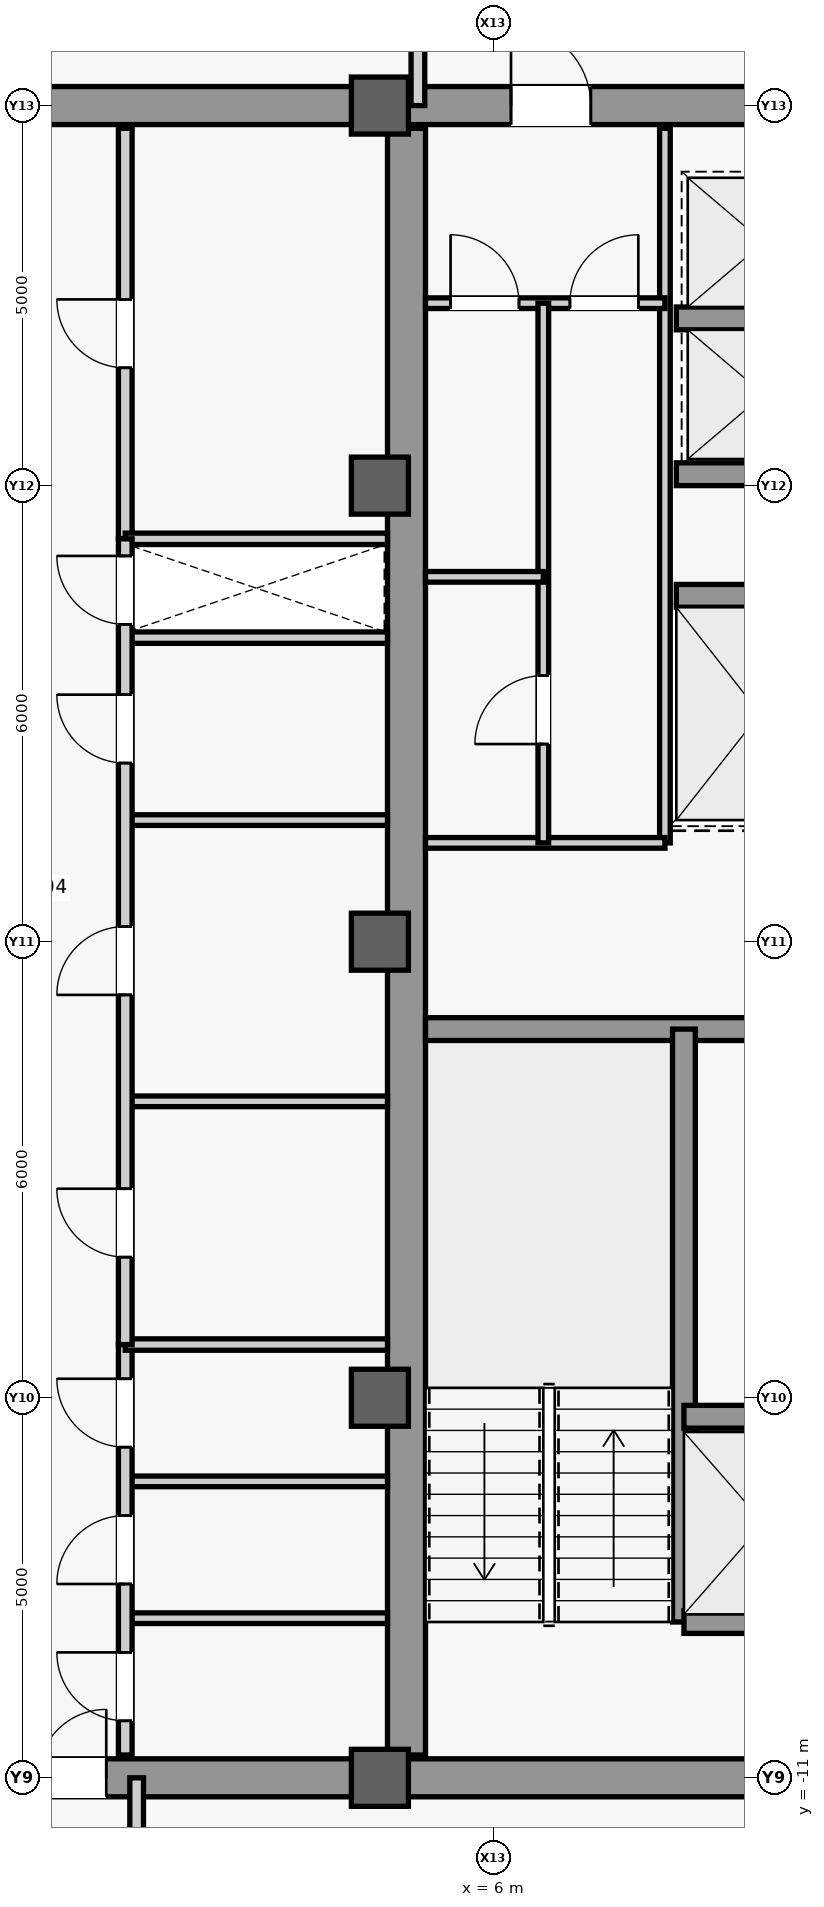
"""IFC4 building model, lengths in metres.
Left out: names, types, materials, properties, quantities, classifications, styles, units other than length and angle.
Written with IfcOpenShell. Run it as: python <this file> out.ifc"""

import sys

from ifc_helpers import new_model, si_unit, direction, frame, frame_2d, origin, origin_2d, place, context, subcontext, project, spatial, rectangle, extrude, source, transform, mapped, element, fill, save


model = new_model("IFC4")
c1 = context("Model", 3, precision=1e-05, world=origin(), true_north=direction((0.0, 1.0)))
c2 = subcontext(c1, "Body", "Model", "MODEL_VIEW")
j1 = project(units=[si_unit("LENGTHUNIT", "METRE"), si_unit("PLANEANGLEUNIT", "RADIAN")], contexts=[c1])
p1 = place(None, origin())
s1 = spatial("IfcSite", under=j1, at=p1, CompositionType="ELEMENT")
p2 = place(p1, origin())
s2 = spatial("IfcBuilding", under=s1, at=p2, CompositionType="ELEMENT")
p3 = place(p2, frame((0.0, 0.0, 342.3)))
s3 = spatial("IfcBuildingStorey", under=s2, at=p3, CompositionType="ELEMENT", Elevation=342.3)
m1 = source(origin(), c2, "Body", "SweptSolid", [
    extrude(rectangle(XDim=21.4, YDim=0.5, at=frame_2d((10.7, 0.0))), origin(), (0.0, 0.0, 1.0), 3.7),
])
p4 = place(p3, frame((4.85, -10.7, 0.0), z_axis=(0.0, 0.0, 1.0), x_axis=(0.0, 1.0, 0.0)))
e1 = element("IfcWall", 1, at=p4, inside=s3, PredefinedType="SHEAR", context=c2, shape_type="MappedRepresentation", body=[
    mapped(m1, transform((0.0, 0.0, 0.0), scale=1.0)),
])
m2 = source(origin(), c2, "Body", "SweptSolid", [
    extrude(rectangle(XDim=5.9, YDim=0.5, at=frame_2d((2.95, 0.0))), origin(), (0.0, 0.0, 1.0), 3.7),
])
p5 = place(p3, frame((4.85, -11.0, 0.0), z_axis=(0.0, 0.0, 1.0), x_axis=(1.0, 0.0, 0.0)))
e2 = element("IfcWall", 2, at=p5, inside=s3, PredefinedType="SHEAR", context=c2, shape_type="MappedRepresentation", body=[
    mapped(m2, transform((0.0, 0.0, 0.0), scale=1.0)),
])
p6 = place(p3, frame((4.85, 11.0, 0.0), z_axis=(0.0, 0.0, 1.0), x_axis=(1.0, 0.0, 0.0)))
e3 = element("IfcWall", 3, at=p6, inside=s3, PredefinedType="SHEAR", context=c2, shape_type="MappedRepresentation", body=[
    mapped(m2, transform((0.0, 0.0, 0.0), scale=1.0)),
])
m3 = source(origin(), c2, "Body", "SweptSolid", [
    extrude(rectangle(XDim=1.05, YDim=2.2, at=frame_2d((0.525, 1.1))), frame((0.0, 0.26, 0.0), z_axis=(0.0, -1.0, 0.0), x_axis=(1.0, 0.0, 0.0)), (0.0, 0.0, 1.0), 0.52),
])
p7 = place(p6, frame((1.375, 0.0, 0.0)))
e4 = element("IfcOpeningElement", 4, at=p7, cuts=e3, PredefinedType="OPENING", context=c2, shape_type="MappedRepresentation", body=[
    mapped(m3, transform((0.0, 0.0, 0.0), scale=1.0)),
])
m4 = source(origin(), c2, "Body", "SweptSolid", [
    extrude(rectangle(XDim=5.65, YDim=0.3, at=frame_2d((2.825, 0.0))), origin(), (0.0, 0.0, 1.0), 3.7),
])
p8 = place(p3, frame((5.1, -1.15, 0.0), z_axis=(0.0, 0.0, 1.0), x_axis=(1.0, 0.0, 0.0)))
e5 = element("IfcWall", 5, at=p8, inside=s3, PredefinedType="SHEAR", context=c2, shape_type="MappedRepresentation", body=[
    mapped(m4, transform((0.0, 0.0, 0.0), scale=1.0)),
])
m5 = source(origin(), c2, "Body", "SweptSolid", [
    extrude(rectangle(XDim=9.2, YDim=0.5, at=frame_2d((4.6, 0.0))), origin(), (0.0, 0.0, 1.0), 3.7),
])
p9 = place(p3, frame((-4.6, -11.0, 0.0), z_axis=(0.0, 0.0, 1.0), x_axis=(1.0, 0.0, 0.0)))
e6 = element("IfcWall", 6, at=p9, inside=s3, PredefinedType="SHEAR", context=c2, shape_type="MappedRepresentation", body=[
    mapped(m5, transform((0.0, 0.0, 0.0), scale=1.0)),
])
m6 = source(origin(), c2, "Body", "SweptSolid", [
    extrude(rectangle(XDim=1.8, YDim=2.25, at=frame_2d((0.9, 1.125))), frame((0.0, 0.26, 0.0), z_axis=(0.0, -1.0, 0.0), x_axis=(1.0, 0.0, 0.0)), (0.0, 0.0, 1.0), 0.52),
])
p10 = place(p9, frame((3.7, 0.0, 0.0)))
e7 = element("IfcOpeningElement", 7, at=p10, cuts=e6, PredefinedType="OPENING", context=c2, shape_type="MappedRepresentation", body=[
    mapped(m6, transform((0.0, 0.0, 0.0), scale=1.0)),
])
p11 = place(p3, frame((-4.6, 11.0, 0.0), z_axis=(0.0, 0.0, 1.0), x_axis=(1.0, 0.0, 0.0)))
e8 = element("IfcWall", 8, at=p11, inside=s3, PredefinedType="SHEAR", context=c2, shape_type="MappedRepresentation", body=[
    mapped(m5, transform((0.0, 0.0, 0.0), scale=1.0)),
])
m7 = source(origin(), c2, "Body", "SweptSolid", [
    extrude(rectangle(XDim=0.75, YDim=0.75, at=origin_2d()), origin(), (0.0, 0.0, 1.0), 4.0),
])
for number, where, z_axis, x_axis in (
    (9, (4.5, -11.0, 0.0), (0.0, 0.0, 1.0), (1.0, 0.0, 0.0)),
    (10, (4.5, -6.0, 0.0), (0.0, 0.0, 1.0), (1.0, 0.0, 0.0)),
    (11, (4.5, 0.0, 0.0), (0.0, 0.0, 1.0), (1.0, 0.0, 0.0)),
    (12, (4.5, 6.0, 0.0), (0.0, 0.0, 1.0), (1.0, 0.0, 0.0)),
    (13, (4.5, 11.0, 0.0), (0.0, 0.0, 1.0), (1.0, 0.0, 0.0)),
):
    element("IfcColumn", number, at=place(p3, frame(where, z_axis=z_axis, x_axis=x_axis)), inside=s3, PredefinedType="COLUMN", context=c2, shape_type="MappedRepresentation", body=[
        mapped(m7, transform((0.0, 0.0, 0.0), scale=1.0)),
    ])
m8 = source(origin(), c2, "Body", "SweptSolid", [
    extrude(rectangle(XDim=7.8, YDim=0.3, at=frame_2d((3.9, 0.0))), origin(), (0.0, 0.0, 1.0), 3.7),
])
p12 = place(p3, frame((8.5, -8.95, 0.0), z_axis=(0.0, 0.0, 1.0), x_axis=(0.0, 1.0, 0.0)))
e14 = element("IfcWall", 14, at=p12, inside=s3, PredefinedType="SHEAR", context=c2, shape_type="MappedRepresentation", body=[
    mapped(m8, transform((0.0, 0.0, 0.0), scale=1.0)),
])
m9 = source(origin(), c2, "Body", "SweptSolid", [
    extrude(rectangle(XDim=2.2, YDim=0.3, at=frame_2d((1.1, 0.0))), origin(), (0.0, 0.0, 1.0), 3.7),
])
for number, where, z_axis, x_axis in (
    (15, (8.5, -8.95, 0.0), (0.0, 0.0, 1.0), (1.0, 0.0, 0.0)),
    (16, (8.5, -6.25, 0.0), (0.0, 0.0, 1.0), (1.0, 0.0, 0.0)),
):
    element("IfcWall", number, at=place(p3, frame(where, z_axis=z_axis, x_axis=x_axis)), inside=s3, PredefinedType="SHEAR", context=c2, shape_type="MappedRepresentation", body=[
        mapped(m9, transform((0.0, 0.0, 0.0), scale=1.0)),
    ])
m10 = source(origin(), c2, "Body", "SweptSolid", [
    extrude(rectangle(XDim=2.3, YDim=0.3, at=frame_2d((1.15, 0.0))), origin(), (0.0, 0.0, 1.0), 3.7),
])
for number, where, z_axis, x_axis in (
    (17, (8.4, 4.55, 0.0), (0.0, 0.0, 1.0), (1.0, 0.0, 0.0)),
    (18, (8.4, 6.15, 0.0), (0.0, 0.0, 1.0), (1.0, 0.0, 0.0)),
    (19, (8.4, 8.2, 0.0), (0.0, 0.0, 1.0), (1.0, 0.0, 0.0)),
):
    element("IfcWall", number, at=place(p3, frame(where, z_axis=z_axis, x_axis=x_axis)), inside=s3, PredefinedType="SHEAR", context=c2, shape_type="MappedRepresentation", body=[
        mapped(m10, transform((0.0, 0.0, 0.0), scale=1.0)),
    ])
m11 = source(origin(), c2, "Body", "SweptSolid", [
    extrude(rectangle(XDim=9.4, YDim=0.14, at=frame_2d((4.7, 0.0))), origin(), (0.0, 0.0, 1.0), 3.7),
])
p13 = place(p3, frame((8.25, 1.3, 0.0), z_axis=(0.0, 0.0, 1.0), x_axis=(0.0, 1.0, 0.0)))
e20 = element("IfcWall", 20, at=p13, inside=s3, PredefinedType="PARTITIONING", context=c2, shape_type="MappedRepresentation", body=[
    mapped(m11, transform((0.0, 0.0, 0.0), scale=1.0)),
])
m12 = source(origin(), c2, "Body", "SweptSolid", [
    extrude(rectangle(XDim=3.15, YDim=0.14, at=frame_2d((1.575, 0.0))), origin(), (0.0, 0.0, 1.0), 3.7),
])
p14 = place(p3, frame((5.1, 1.3, 0.0), z_axis=(0.0, 0.0, 1.0), x_axis=(1.0, 0.0, 0.0)))
e21 = element("IfcWall", 21, at=p14, inside=s3, PredefinedType="PARTITIONING", context=c2, shape_type="MappedRepresentation", body=[
    mapped(m12, transform((0.0, 0.0, 0.0), scale=1.0)),
])
p15 = place(p3, frame((5.1, 8.4, 0.0), z_axis=(0.0, 0.0, 1.0), x_axis=(1.0, 0.0, 0.0)))
e22 = element("IfcWall", 22, at=p15, inside=s3, PredefinedType="PARTITIONING", context=c2, shape_type="MappedRepresentation", body=[
    mapped(m12, transform((0.0, 0.0, 0.0), scale=1.0)),
])
m13 = source(origin(), c2, "Body", "SweptSolid", [
    extrude(rectangle(XDim=0.9, YDim=2.15, at=frame_2d((0.45, 1.075))), frame((0.0, 0.08, 0.0), z_axis=(0.0, -1.0, 0.0), x_axis=(1.0, 0.0, 0.0)), (0.0, 0.0, 1.0), 0.16),
])
p16 = place(p15, frame((0.33, 0.0, 0.0)))
e23 = element("IfcOpeningElement", 23, at=p16, cuts=e22, PredefinedType="OPENING", context=c2, shape_type="MappedRepresentation", body=[
    mapped(m13, transform((0.0, 0.0, 0.0), scale=1.0)),
])
p17 = place(p15, frame((1.9, 0.0, 0.0)))
e24 = element("IfcOpeningElement", 24, at=p17, cuts=e22, PredefinedType="OPENING", context=c2, shape_type="MappedRepresentation", body=[
    mapped(m13, transform((0.0, 0.0, 0.0), scale=1.0)),
])
m14 = source(origin(), c2, "Body", "SweptSolid", [
    extrude(rectangle(XDim=7.1, YDim=0.14, at=frame_2d((3.55, 0.0))), origin(), (0.0, 0.0, 1.0), 3.7),
])
p18 = place(p3, frame((6.65, 1.3, 0.0), z_axis=(0.0, 0.0, 1.0), x_axis=(0.0, 1.0, 0.0)))
e25 = element("IfcWall", 25, at=p18, inside=s3, PredefinedType="PARTITIONING", context=c2, shape_type="MappedRepresentation", body=[
    mapped(m14, transform((0.0, 0.0, 0.0), scale=1.0)),
])
p19 = place(p18, frame((1.3, 0.0, 0.0)))
e26 = element("IfcOpeningElement", 26, at=p19, cuts=e25, PredefinedType="OPENING", context=c2, shape_type="MappedRepresentation", body=[
    mapped(m13, transform((0.0, 0.0, 0.0), scale=1.0)),
])
m15 = source(origin(), c2, "Body", "SweptSolid", [
    extrude(rectangle(XDim=1.55, YDim=0.14, at=frame_2d((0.775, 0.0))), origin(), (0.0, 0.0, 1.0), 3.7),
])
p20 = place(p3, frame((5.1, 4.8, 0.0), z_axis=(0.0, 0.0, 1.0), x_axis=(1.0, 0.0, 0.0)))
e27 = element("IfcWall", 27, at=p20, inside=s3, PredefinedType="PARTITIONING", context=c2, shape_type="MappedRepresentation", body=[
    mapped(m15, transform((0.0, 0.0, 0.0), scale=1.0)),
])
m16 = source(origin(), c2, "Body", "SweptSolid", [
    extrude(rectangle(XDim=3.45, YDim=0.15, at=frame_2d((1.725, 0.0))), origin(), (0.0, 0.0, 1.0), 3.7),
])
p21 = place(p3, frame((1.15, 4.0, 0.0), z_axis=(0.0, 0.0, 1.0), x_axis=(1.0, 0.0, 0.0)))
e28 = element("IfcWall", 28, at=p21, inside=s3, PredefinedType="PARTITIONING", context=c2, shape_type="MappedRepresentation", body=[
    mapped(m16, transform((0.0, 0.0, 0.0), scale=1.0)),
])
m17 = source(origin(), c2, "Body", "SweptSolid", [
    extrude(rectangle(XDim=3.45, YDim=0.14, at=frame_2d((1.725, 0.0))), origin(), (0.0, 0.0, 1.0), 3.7),
])
for number, where, z_axis, x_axis in (
    (29, (1.15, -8.9, 0.0), (0.0, 0.0, 1.0), (1.0, 0.0, 0.0)),
    (30, (1.15, -7.1, 0.0), (0.0, 0.0, 1.0), (1.0, 0.0, 0.0)),
):
    element("IfcWall", number, at=place(p3, frame(where, z_axis=z_axis, x_axis=x_axis)), inside=s3, PredefinedType="PARTITIONING", context=c2, shape_type="MappedRepresentation", body=[
        mapped(m17, transform((0.0, 0.0, 0.0), scale=1.0)),
    ])
m18 = source(origin(), c2, "Body", "SweptSolid", [
    extrude(rectangle(XDim=5.4, YDim=0.18, at=frame_2d((2.7, 0.0))), origin(), (0.0, 0.0, 1.0), 3.7),
])
p22 = place(p3, frame((1.15, -10.7, 0.0), z_axis=(0.0, 0.0, 1.0), x_axis=(0.0, 1.0, 0.0)))
e31 = element("IfcWall", 31, at=p22, inside=s3, PredefinedType="PARTITIONING", context=c2, shape_type="MappedRepresentation", body=[
    mapped(m18, transform((0.0, 0.0, 0.0), scale=1.0)),
])
m19 = source(origin(), c2, "Body", "SweptSolid", [
    extrude(rectangle(XDim=0.9, YDim=2.15, at=frame_2d((0.45, 1.075))), frame((0.0, 0.1, 0.0), z_axis=(0.0, -1.0, 0.0), x_axis=(1.0, 0.0, 0.0)), (0.0, 0.0, 1.0), 0.2),
])
p23 = place(p22, frame((0.45, 0.0, 0.0)))
e32 = element("IfcOpeningElement", 32, at=p23, cuts=e31, PredefinedType="OPENING", context=c2, shape_type="MappedRepresentation", body=[
    mapped(m19, transform((0.0, 0.0, 0.0), scale=1.0)),
])
p24 = place(p22, frame((2.25, 0.0, 0.0)))
e33 = element("IfcOpeningElement", 33, at=p24, cuts=e31, PredefinedType="OPENING", context=c2, shape_type="MappedRepresentation", body=[
    mapped(m19, transform((0.0, 0.0, 0.0), scale=1.0)),
])
p25 = place(p22, frame((4.05, 0.0, 0.0)))
e34 = element("IfcOpeningElement", 34, at=p25, cuts=e31, PredefinedType="OPENING", context=c2, shape_type="MappedRepresentation", body=[
    mapped(m19, transform((0.0, 0.0, 0.0), scale=1.0)),
])
p26 = place(p3, frame((1.15, -5.3, 0.0), z_axis=(0.0, 0.0, 1.0), x_axis=(1.0, 0.0, 0.0)))
e35 = element("IfcWall", 35, at=p26, inside=s3, PredefinedType="PARTITIONING", context=c2, shape_type="MappedRepresentation", body=[
    mapped(m16, transform((0.0, 0.0, 0.0), scale=1.0)),
])
p27 = place(p3, frame((1.15, 5.3, 0.0), z_axis=(0.0, 0.0, 1.0), x_axis=(0.0, 1.0, 0.0)))
e36 = element("IfcWall", 36, at=p27, inside=s3, PredefinedType="PARTITIONING", context=c2, shape_type="MappedRepresentation", body=[
    mapped(m18, transform((0.0, 0.0, 0.0), scale=1.0)),
])
p28 = place(p27, frame((2.25, 0.0, 0.0)))
e37 = element("IfcOpeningElement", 37, at=p28, cuts=e36, PredefinedType="OPENING", context=c2, shape_type="MappedRepresentation", body=[
    mapped(m19, transform((0.0, 0.0, 0.0), scale=1.0)),
])
p29 = place(p3, frame((1.15, 5.3, 0.0), z_axis=(0.0, 0.0, 1.0), x_axis=(1.0, 0.0, 0.0)))
e38 = element("IfcWall", 38, at=p29, inside=s3, PredefinedType="PARTITIONING", context=c2, shape_type="MappedRepresentation", body=[
    mapped(m16, transform((0.0, 0.0, 0.0), scale=1.0)),
])
for number, where, z_axis, x_axis in (
    (39, (1.15, -2.1, 0.0), (0.0, 0.0, 1.0), (1.0, 0.0, 0.0)),
    (40, (1.15, 1.6, 0.0), (0.0, 0.0, 1.0), (1.0, 0.0, 0.0)),
):
    element("IfcWall", number, at=place(p3, frame(where, z_axis=z_axis, x_axis=x_axis)), inside=s3, PredefinedType="PARTITIONING", context=c2, shape_type="MappedRepresentation", body=[
        mapped(m17, transform((0.0, 0.0, 0.0), scale=1.0)),
    ])
m20 = source(origin(), c2, "Body", "SweptSolid", [
    extrude(rectangle(XDim=10.6, YDim=0.18, at=frame_2d((5.3, 0.0))), origin(), (0.0, 0.0, 1.0), 3.7),
])
p30 = place(p3, frame((1.15, -5.3, 0.0), z_axis=(0.0, 0.0, 1.0), x_axis=(0.0, 1.0, 0.0)))
e41 = element("IfcWall", 41, at=p30, inside=s3, PredefinedType="PARTITIONING", context=c2, shape_type="MappedRepresentation", body=[
    mapped(m20, transform((0.0, 0.0, 0.0), scale=1.0)),
])
p31 = place(p30, frame((1.15, 0.0, 0.0)))
e42 = element("IfcOpeningElement", 42, at=p31, cuts=e41, PredefinedType="OPENING", context=c2, shape_type="MappedRepresentation", body=[
    mapped(m19, transform((0.0, 0.0, 0.0), scale=1.0)),
])
p32 = place(p30, frame((4.6, 0.0, 0.0)))
e43 = element("IfcOpeningElement", 43, at=p32, cuts=e41, PredefinedType="OPENING", context=c2, shape_type="MappedRepresentation", body=[
    mapped(m19, transform((0.0, 0.0, 0.0), scale=1.0)),
])
p33 = place(p30, frame((7.65, 0.0, 0.0)))
e44 = element("IfcOpeningElement", 44, at=p33, cuts=e41, PredefinedType="OPENING", context=c2, shape_type="MappedRepresentation", body=[
    mapped(m19, transform((0.0, 0.0, 0.0), scale=1.0)),
])
p34 = place(p30, frame((9.475, 0.0, 0.0)))
e45 = element("IfcOpeningElement", 45, at=p34, cuts=e41, PredefinedType="OPENING", context=c2, shape_type="MappedRepresentation", body=[
    mapped(m19, transform((0.0, 0.0, 0.0), scale=1.0)),
])
m21 = source(origin(), c2, "Body", "SweptSolid", [
    extrude(rectangle(XDim=3.9, YDim=0.18, at=frame_2d((1.95, 0.0))), origin(), (0.0, 0.0, 1.0), 3.7),
])
p35 = place(p3, frame((1.3, -14.9, 0.0), z_axis=(0.0, 0.0, 1.0), x_axis=(0.0, 1.0, 0.0)))
e46 = element("IfcWall", 46, at=p35, inside=s3, PredefinedType="PARTITIONING", context=c2, shape_type="MappedRepresentation", body=[
    mapped(m21, transform((0.0, 0.0, 0.0), scale=1.0)),
])
m22 = source(origin(), c2, "Body", "SweptSolid", [
    extrude(rectangle(XDim=2.6, YDim=0.18, at=frame_2d((1.3, 0.0))), origin(), (0.0, 0.0, 1.0), 3.7),
])
p36 = place(p3, frame((5.0, 11.0, 0.0), z_axis=(0.0, 0.0, 1.0), x_axis=(0.0, 1.0, 0.0)))
e47 = element("IfcWall", 47, at=p36, inside=s3, PredefinedType="PARTITIONING", context=c2, shape_type="MappedRepresentation", body=[
    mapped(m22, transform((0.0, 0.0, 0.0), scale=1.0)),
])
p37 = place(p36, frame((0.85, 0.0, 0.0)))
e48 = element("IfcOpeningElement", 48, at=p37, cuts=e47, PredefinedType="OPENING", context=c2, shape_type="MappedRepresentation", body=[
    mapped(m19, transform((0.0, 0.0, 0.0), scale=1.0)),
])
m23 = source(origin(), c2, "Body", "SweptSolid", [
    extrude(rectangle(XDim=1.05, YDim=2.2, at=frame_2d((0.525, 1.1))), frame((0.0, 0.025, 0.0), z_axis=(0.0, -1.0, 0.0), x_axis=(1.0, 0.0, 0.0)), (0.0, 0.0, 1.0), 0.05),
])
p38 = place(p7, origin())
e49 = element("IfcDoor", 49, at=p38, inside=s3, OperationType="SINGLE_SWING_LEFT", PredefinedType="DOOR", context=c2, shape_type="MappedRepresentation", body=[
    mapped(m23, transform((0.0, 0.0, 0.0), scale=1.0)),
])
fill(e4, e49)
m24 = source(origin(), c2, "Body", "SweptSolid", [
    extrude(rectangle(XDim=0.9, YDim=2.15, at=frame_2d((0.45, 1.075))), frame((0.0, 0.025, 0.0), z_axis=(0.0, -1.0, 0.0), x_axis=(1.0, 0.0, 0.0)), (0.0, 0.0, 1.0), 0.05),
])
p39 = place(p16, origin())
e50 = element("IfcDoor", 50, at=p39, inside=s3, OperationType="SINGLE_SWING_LEFT", PredefinedType="DOOR", context=c2, shape_type="MappedRepresentation", body=[
    mapped(m24, transform((0.0, 0.0, 0.0), scale=1.0)),
])
fill(e23, e50)
p40 = place(p17, origin())
e51 = element("IfcDoor", 51, at=p40, inside=s3, OperationType="SINGLE_SWING_RIGHT", PredefinedType="DOOR", context=c2, shape_type="MappedRepresentation", body=[
    mapped(m24, transform((0.0, 0.0, 0.0), scale=1.0)),
])
fill(e24, e51)
p41 = place(p19, origin())
e52 = element("IfcDoor", 52, at=p41, inside=s3, OperationType="SINGLE_SWING_LEFT", PredefinedType="DOOR", context=c2, shape_type="MappedRepresentation", body=[
    mapped(m24, transform((0.0, 0.0, 0.0), scale=1.0)),
])
fill(e26, e52)
p42 = place(p23, origin())
e53 = element("IfcDoor", 53, at=p42, inside=s3, OperationType="SINGLE_SWING_RIGHT", PredefinedType="DOOR", context=c2, shape_type="MappedRepresentation", body=[
    mapped(m24, transform((0.0, 0.0, 0.0), scale=1.0)),
])
fill(e32, e53)
p43 = place(p24, origin())
e54 = element("IfcDoor", 54, at=p43, inside=s3, OperationType="SINGLE_SWING_LEFT", PredefinedType="DOOR", context=c2, shape_type="MappedRepresentation", body=[
    mapped(m24, transform((0.0, 0.0, 0.0), scale=1.0)),
])
fill(e33, e54)
p44 = place(p25, origin())
e55 = element("IfcDoor", 55, at=p44, inside=s3, OperationType="SINGLE_SWING_RIGHT", PredefinedType="DOOR", context=c2, shape_type="MappedRepresentation", body=[
    mapped(m24, transform((0.0, 0.0, 0.0), scale=1.0)),
])
fill(e34, e55)
m25 = source(origin(), c2, "Body", "SweptSolid", [
    extrude(rectangle(XDim=1.8, YDim=2.25, at=frame_2d((0.9, 1.125))), frame((0.0, 0.025, 0.0), z_axis=(0.0, -1.0, 0.0), x_axis=(1.0, 0.0, 0.0)), (0.0, 0.0, 1.0), 0.05),
])
p45 = place(p10, origin())
e56 = element("IfcDoor", 56, at=p45, inside=s3, OperationType="SINGLE_SWING_LEFT", PredefinedType="DOOR", context=c2, shape_type="MappedRepresentation", body=[
    mapped(m25, transform((0.0, 0.0, 0.0), scale=1.0)),
])
fill(e7, e56)
p46 = place(p28, origin())
e57 = element("IfcDoor", 57, at=p46, inside=s3, OperationType="SINGLE_SWING_RIGHT", PredefinedType="DOOR", context=c2, shape_type="MappedRepresentation", body=[
    mapped(m24, transform((0.0, 0.0, 0.0), scale=1.0)),
])
fill(e37, e57)
p47 = place(p31, origin())
e58 = element("IfcDoor", 58, at=p47, inside=s3, OperationType="SINGLE_SWING_RIGHT", PredefinedType="DOOR", context=c2, shape_type="MappedRepresentation", body=[
    mapped(m24, transform((0.0, 0.0, 0.0), scale=1.0)),
])
fill(e42, e58)
p48 = place(p32, origin())
e59 = element("IfcDoor", 59, at=p48, inside=s3, OperationType="SINGLE_SWING_LEFT", PredefinedType="DOOR", context=c2, shape_type="MappedRepresentation", body=[
    mapped(m24, transform((0.0, 0.0, 0.0), scale=1.0)),
])
fill(e43, e59)
p49 = place(p33, origin())
e60 = element("IfcDoor", 60, at=p49, inside=s3, OperationType="SINGLE_SWING_RIGHT", PredefinedType="DOOR", context=c2, shape_type="MappedRepresentation", body=[
    mapped(m24, transform((0.0, 0.0, 0.0), scale=1.0)),
])
fill(e44, e60)
p50 = place(p34, origin())
e61 = element("IfcDoor", 61, at=p50, inside=s3, OperationType="SINGLE_SWING_RIGHT", PredefinedType="DOOR", context=c2, shape_type="MappedRepresentation", body=[
    mapped(m24, transform((0.0, 0.0, 0.0), scale=1.0)),
])
fill(e45, e61)
save(model, sys.argv[1])
